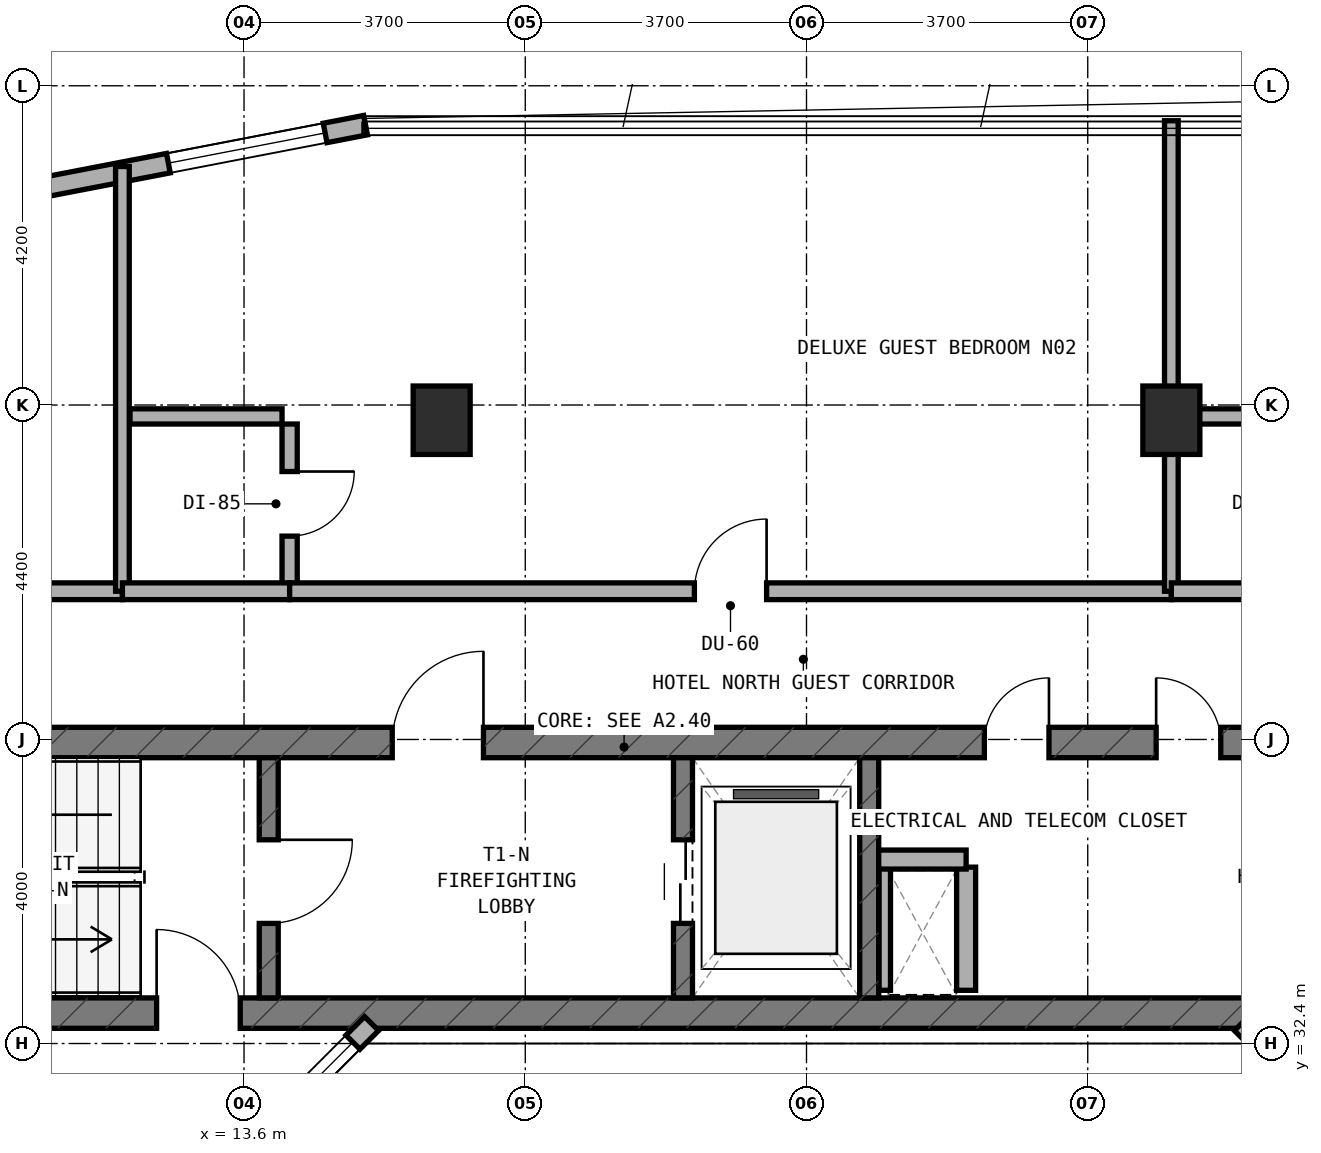
"""IFC4 building model, lengths in metres.
Left out: names, types, materials, properties, quantities, classifications, styles, units other than length and angle.
Written with IfcOpenShell. Run it as: python <this file> out.ifc"""

import sys

from ifc_helpers import new_model, si_unit, direction, frame, frame_2d, origin, origin_2d, place, context, subcontext, project, spatial, rectangle, extrude, element, fill, save


model = new_model("IFC4")
c1 = context("Model", 3, precision=1e-05, world=origin(), true_north=direction((0.0, 1.0)))
c2 = subcontext(c1, "Body", "Model", "MODEL_VIEW")
j1 = project(units=[si_unit("LENGTHUNIT", "METRE"), si_unit("PLANEANGLEUNIT", "RADIAN")], contexts=[c1])
p1 = place(None, origin())
s1 = spatial("IfcSite", under=j1, at=p1, CompositionType="ELEMENT")
p2 = place(p1, origin())
s2 = spatial("IfcBuilding", under=s1, at=p2, CompositionType="ELEMENT")
p3 = place(p2, frame((0.0, 0.0, 177.5)))
s3 = spatial("IfcBuildingStorey", under=s2, at=p3, CompositionType="ELEMENT", Elevation=177.5)
p4 = place(p3, frame((6.4, 32.8, 0.0), z_axis=(0.0, 0.0, 1.0), x_axis=(1.0, 0.0, 0.0)))
e1 = element("IfcWall", 1, at=p4, inside=s3, PredefinedType="SHEAR", context=c2, shape_type="SweptSolid", body=[
    extrude(rectangle(XDim=24.4, YDim=0.4, at=frame_2d((12.2, 0.0))), origin(), (0.0, 0.0, 1.0), 3.6),
])
p5 = place(p4, frame((6.05, 0.0, 0.0)))
e2 = element("IfcOpeningElement", 2, at=p5, cuts=e1, PredefinedType="OPENING", context=c2, shape_type="SweptSolid", body=[
    extrude(rectangle(XDim=1.1, YDim=2.15, at=frame_2d((0.55, 1.075))), frame((0.0, 0.21, 0.0), z_axis=(0.0, -1.0, 0.0), x_axis=(1.0, 0.0, 0.0)), (0.0, 0.0, 1.0), 0.42),
])
p6 = place(p3, frame((6.4, 36.36, 0.0), z_axis=(0.0, 0.0, 1.0), x_axis=(1.0, 0.0, 0.0)))
e3 = element("IfcWall", 3, at=p6, inside=s3, PredefinedType="SHEAR", context=c2, shape_type="SweptSolid", body=[
    extrude(rectangle(XDim=24.4, YDim=0.4, at=frame_2d((12.2, 0.0))), origin(), (0.0, 0.0, 1.0), 3.6),
])
p7 = place(p6, frame((9.15, 0.0, 0.0)))
e4 = element("IfcOpeningElement", 4, at=p7, cuts=e3, PredefinedType="OPENING", context=c2, shape_type="SweptSolid", body=[
    extrude(rectangle(XDim=1.2, YDim=2.15, at=frame_2d((0.6, 1.075))), frame((0.0, 0.21, 0.0), z_axis=(0.0, -1.0, 0.0), x_axis=(1.0, 0.0, 0.0)), (0.0, 0.0, 1.0), 0.42),
])
p8 = place(p6, frame((19.2, 0.0, 0.0)))
e5 = element("IfcOpeningElement", 5, at=p8, cuts=e3, PredefinedType="OPENING", context=c2, shape_type="SweptSolid", body=[
    extrude(rectangle(XDim=0.85, YDim=2.1, at=frame_2d((0.425, 1.05))), frame((0.0, 0.21, 0.0), z_axis=(0.0, -1.0, 0.0), x_axis=(1.0, 0.0, 0.0)), (0.0, 0.0, 1.0), 0.42),
])
p9 = place(p6, frame((16.94, 0.0, 0.0)))
e6 = element("IfcOpeningElement", 6, at=p9, cuts=e3, PredefinedType="OPENING", context=c2, shape_type="SweptSolid", body=[
    extrude(rectangle(XDim=0.85, YDim=2.1, at=frame_2d((0.425, 1.05))), frame((0.0, 0.21, 0.0), z_axis=(0.0, -1.0, 0.0), x_axis=(1.0, 0.0, 0.0)), (0.0, 0.0, 1.0), 0.42),
])
p10 = place(p3, frame((13.925, 33.0, 0.0), z_axis=(0.0, 0.0, 1.0), x_axis=(0.0, 1.0, 0.0)))
e7 = element("IfcWall", 7, at=p10, inside=s3, PredefinedType="STANDARD", context=c2, shape_type="SweptSolid", body=[
    extrude(rectangle(XDim=3.16, YDim=0.25, at=frame_2d((1.58, 0.0))), origin(), (0.0, 0.0, 1.0), 3.32),
])
p11 = place(p10, frame((0.98, 0.0, 0.0)))
e8 = element("IfcOpeningElement", 8, at=p11, cuts=e7, PredefinedType="OPENING", context=c2, shape_type="SweptSolid", body=[
    extrude(rectangle(XDim=1.1, YDim=2.15, at=frame_2d((0.55, 1.075))), frame((0.0, 0.135, 0.0), z_axis=(0.0, -1.0, 0.0), x_axis=(1.0, 0.0, 0.0)), (0.0, 0.0, 1.0), 0.27),
])
p12 = place(p3, frame((19.375, 33.0, 0.0), z_axis=(0.0, 0.0, 1.0), x_axis=(0.0, 1.0, 0.0)))
e9 = element("IfcWall", 9, at=p12, inside=s3, PredefinedType="STANDARD", context=c2, shape_type="SweptSolid", body=[
    extrude(rectangle(XDim=3.16, YDim=0.25, at=frame_2d((1.58, 0.0))), origin(), (0.0, 0.0, 1.0), 3.32),
])
p13 = place(p12, frame((0.98, 0.0, 0.0)))
e10 = element("IfcOpeningElement", 10, at=p13, cuts=e9, PredefinedType="OPENING", context=c2, shape_type="SweptSolid", body=[
    extrude(rectangle(XDim=1.1, YDim=2.15, at=frame_2d((0.55, 1.075))), frame((0.0, 0.135, 0.0), z_axis=(0.0, -1.0, 0.0), x_axis=(1.0, 0.0, 0.0)), (0.0, 0.0, 1.0), 0.27),
])
p14 = place(p3, frame((21.825, 33.0, 0.0), z_axis=(0.0, 0.0, 1.0), x_axis=(0.0, 1.0, 0.0)))
e11 = element("IfcWall", 11, at=p14, inside=s3, PredefinedType="STANDARD", context=c2, shape_type="SweptSolid", body=[
    extrude(rectangle(XDim=3.16, YDim=0.25, at=frame_2d((1.58, 0.0))), origin(), (0.0, 0.0, 1.0), 3.32),
])
for number, where, z_axis, x_axis in (
    (12, (16.2, 40.6, 0.0), (0.0, 0.0, 1.0), (1.0, 0.0, 0.0)),
    (13, (25.8, 40.6, 0.0), (0.0, 0.0, 1.0), (1.0, 0.0, 0.0)),
):
    element("IfcColumn", number, at=place(p3, frame(where, z_axis=z_axis, x_axis=x_axis)), inside=s3, PredefinedType="COLUMN", context=c2, shape_type="SweptSolid", body=[
        extrude(rectangle(XDim=0.75, YDim=0.9, at=origin_2d()), origin(), (0.0, 0.0, 1.0), 3.6),
    ])
p15 = place(p3, frame((13.515, 30.899, 0.0), z_axis=(0.0, 0.0, 1.0), x_axis=(0.707106781187, 0.707106781187, 0.0)))
e14 = element("IfcWall", 14, at=p15, inside=s3, PredefinedType="STANDARD", context=c2, shape_type="SweptSolid", body=[
    extrude(rectangle(XDim=2.493, YDim=0.26, at=frame_2d((1.247, 0.0))), origin(), (0.0, 0.0, 1.0), 3.32),
])
p16 = place(p15, frame((0.347, 0.0, 0.85)))
e15 = element("IfcOpeningElement", 15, at=p16, cuts=e14, PredefinedType="OPENING", context=c2, shape_type="SweptSolid", body=[
    extrude(rectangle(XDim=1.8, YDim=1.5, at=frame_2d((0.9, 0.75))), frame((0.0, 0.14, 0.0), z_axis=(0.0, -1.0, 0.0), x_axis=(1.0, 0.0, 0.0)), (0.0, 0.0, 1.0), 0.28),
])
p17 = place(p3, frame((26.722, 32.662, 0.0), z_axis=(0.0, 0.0, 1.0), x_axis=(0.707106781187, -0.707106781187, 0.0)))
e16 = element("IfcWall", 16, at=p17, inside=s3, PredefinedType="STANDARD", context=c2, shape_type="SweptSolid", body=[
    extrude(rectangle(XDim=2.529, YDim=0.26, at=frame_2d((1.264, 0.0))), origin(), (0.0, 0.0, 1.0), 3.32),
])
p18 = place(p17, frame((0.364, 0.0, 0.85)))
e17 = element("IfcOpeningElement", 17, at=p18, cuts=e16, PredefinedType="OPENING", context=c2, shape_type="SweptSolid", body=[
    extrude(rectangle(XDim=1.8, YDim=1.5, at=frame_2d((0.9, 0.75))), frame((0.0, 0.14, 0.0), z_axis=(0.0, -1.0, 0.0), x_axis=(1.0, 0.0, 0.0)), (0.0, 0.0, 1.0), 0.28),
])
p19 = place(p3, frame((15.199, 44.482, 0.0), z_axis=(0.0, 0.0, 1.0), x_axis=(-0.98192801022, -0.189254809039, 0.0)))
e18 = element("IfcWall", 18, at=p19, inside=s3, PredefinedType="STANDARD", context=c2, shape_type="SweptSolid", body=[
    extrude(rectangle(XDim=9.046, YDim=0.26, at=frame_2d((4.523, 0.0))), origin(), (0.0, 0.0, 1.0), 3.32),
])
p20 = place(p19, frame((0.542, 0.0, 0.85)))
e19 = element("IfcOpeningElement", 19, at=p20, cuts=e18, PredefinedType="OPENING", context=c2, shape_type="SweptSolid", body=[
    extrude(rectangle(XDim=2.1, YDim=1.5, at=frame_2d((1.05, 0.75))), frame((0.0, 0.14, 0.0), z_axis=(0.0, -1.0, 0.0), x_axis=(1.0, 0.0, 0.0)), (0.0, 0.0, 1.0), 0.28),
])
p21 = place(p19, frame((5.163, 0.0, 0.85)))
e20 = element("IfcOpeningElement", 20, at=p21, cuts=e18, PredefinedType="OPENING", context=c2, shape_type="SweptSolid", body=[
    extrude(rectangle(XDim=2.1, YDim=1.5, at=frame_2d((1.05, 0.75))), frame((0.0, 0.14, 0.0), z_axis=(0.0, -1.0, 0.0), x_axis=(1.0, 0.0, 0.0)), (0.0, 0.0, 1.0), 0.28),
])
p22 = place(p3, frame((22.03, 33.1, 0.0), z_axis=(0.0, 0.0, 1.0), x_axis=(0.0, 1.0, 0.0)))
e21 = element("IfcWall", 21, at=p22, inside=s3, PredefinedType="PARTITIONING", context=c2, shape_type="SweptSolid", body=[
    extrude(rectangle(XDim=1.62, YDim=0.15, at=frame_2d((0.81, 0.0))), origin(), (0.0, 0.0, 1.0), 3.32),
])
p23 = place(p3, frame((23.1, 33.1, 0.0), z_axis=(0.0, 0.0, 1.0), x_axis=(0.0, 1.0, 0.0)))
e22 = element("IfcWall", 22, at=p23, inside=s3, PredefinedType="SOLIDWALL", context=c2, shape_type="SweptSolid", body=[
    extrude(rectangle(XDim=1.62, YDim=0.25, at=frame_2d((0.81, 0.0))), origin(), (0.0, 0.0, 1.0), 3.32),
])
p24 = place(p3, frame((21.95, 34.82, 0.0), z_axis=(0.0, 0.0, 1.0), x_axis=(1.0, 0.0, 0.0)))
e23 = element("IfcWall", 23, at=p24, inside=s3, PredefinedType="SOLIDWALL", context=c2, shape_type="SweptSolid", body=[
    extrude(rectangle(XDim=1.15, YDim=0.25, at=frame_2d((0.575, 0.0))), origin(), (0.0, 0.0, 1.0), 3.32),
])
p25 = place(p3, frame((5.55, 38.35, 0.0), z_axis=(0.0, 0.0, 1.0), x_axis=(1.0, 0.0, 0.0)))
e24 = element("IfcWall", 24, at=p25, inside=s3, PredefinedType="SOLIDWALL", context=c2, shape_type="SweptSolid", body=[
    extrude(rectangle(XDim=6.45, YDim=0.22, at=frame_2d((3.225, 0.0))), origin(), (0.0, 0.0, 1.0), 2.995),
])
p26 = place(p25, frame((3.03, 0.0, 0.0)))
e25 = element("IfcOpeningElement", 25, at=p26, cuts=e24, PredefinedType="OPENING", context=c2, shape_type="SweptSolid", body=[
    extrude(rectangle(XDim=0.95, YDim=2.1, at=frame_2d((0.475, 1.05))), frame((0.0, 0.12, 0.0), z_axis=(0.0, -1.0, 0.0), x_axis=(1.0, 0.0, 0.0)), (0.0, 0.0, 1.0), 0.24),
])
p27 = place(p3, frame((12.0, 38.35, 0.0), z_axis=(0.0, 0.0, 1.0), x_axis=(0.0, 1.0, 0.0)))
e26 = element("IfcWall", 26, at=p27, inside=s3, PredefinedType="SOLIDWALL", context=c2, shape_type="SweptSolid", body=[
    extrude(rectangle(XDim=5.588, YDim=0.18, at=frame_2d((2.794, 0.0))), origin(), (0.0, 0.0, 1.0), 2.845),
])
p28 = place(p3, frame((14.2, 38.45, 0.0), z_axis=(0.0, 0.0, 1.0), x_axis=(0.0, 1.0, 0.0)))
e27 = element("IfcWall", 27, at=p28, inside=s3, PredefinedType="PLUMBINGWALL", context=c2, shape_type="SweptSolid", body=[
    extrude(rectangle(XDim=2.1, YDim=0.2, at=frame_2d((1.05, 0.0))), origin(), (0.0, 0.0, 1.0), 2.845),
])
p29 = place(p28, frame((0.625, 0.0, 0.0)))
e28 = element("IfcOpeningElement", 28, at=p29, cuts=e27, PredefinedType="OPENING", context=c2, shape_type="SweptSolid", body=[
    extrude(rectangle(XDim=0.85, YDim=2.1, at=frame_2d((0.425, 1.05))), frame((0.0, 0.11, 0.0), z_axis=(0.0, -1.0, 0.0), x_axis=(1.0, 0.0, 0.0)), (0.0, 0.0, 1.0), 0.22),
])
p30 = place(p3, frame((12.1, 40.65, 0.0), z_axis=(0.0, 0.0, 1.0), x_axis=(1.0, 0.0, 0.0)))
e29 = element("IfcWall", 29, at=p30, inside=s3, PredefinedType="PLUMBINGWALL", context=c2, shape_type="SweptSolid", body=[
    extrude(rectangle(XDim=2.0, YDim=0.2, at=frame_2d((1.0, 0.0))), origin(), (0.0, 0.0, 1.0), 2.935),
])
p31 = place(p3, frame((12.0, 38.35, 0.0), z_axis=(0.0, 0.0, 1.0), x_axis=(1.0, 0.0, 0.0)))
e30 = element("IfcWall", 30, at=p31, inside=s3, PredefinedType="SOLIDWALL", context=c2, shape_type="SweptSolid", body=[
    extrude(rectangle(XDim=2.2, YDim=0.22, at=frame_2d((1.1, 0.0))), origin(), (0.0, 0.0, 1.0), 3.32),
])
p32 = place(p3, frame((14.2, 38.35, 0.0), z_axis=(0.0, 0.0, 1.0), x_axis=(1.0, 0.0, 0.0)))
e31 = element("IfcWall", 31, at=p32, inside=s3, PredefinedType="SOLIDWALL", context=c2, shape_type="SweptSolid", body=[
    extrude(rectangle(XDim=11.6, YDim=0.22, at=frame_2d((5.8, 0.0))), origin(), (0.0, 0.0, 1.0), 2.995),
])
p33 = place(p32, frame((5.325, 0.0, 0.0)))
e32 = element("IfcOpeningElement", 32, at=p33, cuts=e31, PredefinedType="OPENING", context=c2, shape_type="SweptSolid", body=[
    extrude(rectangle(XDim=0.95, YDim=2.1, at=frame_2d((0.475, 1.05))), frame((0.0, 0.12, 0.0), z_axis=(0.0, -1.0, 0.0), x_axis=(1.0, 0.0, 0.0)), (0.0, 0.0, 1.0), 0.24),
])
p34 = place(p3, frame((25.8, 38.35, 0.0), z_axis=(0.0, 0.0, 1.0), x_axis=(0.0, 1.0, 0.0)))
e33 = element("IfcWall", 33, at=p34, inside=s3, PredefinedType="SOLIDWALL", context=c2, shape_type="SweptSolid", body=[
    extrude(rectangle(XDim=6.19, YDim=0.18, at=frame_2d((3.095, 0.0))), origin(), (0.0, 0.0, 1.0), 2.935),
])
p35 = place(p3, frame((25.9, 40.65, 0.0), z_axis=(0.0, 0.0, 1.0), x_axis=(1.0, 0.0, 0.0)))
e34 = element("IfcWall", 34, at=p35, inside=s3, PredefinedType="PLUMBINGWALL", context=c2, shape_type="SweptSolid", body=[
    extrude(rectangle(XDim=2.0, YDim=0.2, at=frame_2d((1.0, 0.0))), origin(), (0.0, 0.0, 1.0), 2.935),
])
p36 = place(p3, frame((25.8, 38.35, 0.0), z_axis=(0.0, 0.0, 1.0), x_axis=(1.0, 0.0, 0.0)))
e35 = element("IfcWall", 35, at=p36, inside=s3, PredefinedType="SOLIDWALL", context=c2, shape_type="SweptSolid", body=[
    extrude(rectangle(XDim=2.2, YDim=0.22, at=frame_2d((1.1, 0.0))), origin(), (0.0, 0.0, 1.0), 2.995),
])
p37 = place(p16, origin())
e36 = element("IfcWindow", 36, at=p37, inside=s3, PartitioningType="SINGLE_PANEL", PredefinedType="WINDOW", context=c2, shape_type="SweptSolid", body=[
    extrude(rectangle(XDim=1.8, YDim=1.5, at=frame_2d((0.9, 0.75))), frame((0.0, 0.03, 0.0), z_axis=(0.0, -1.0, 0.0), x_axis=(1.0, 0.0, 0.0)), (0.0, 0.0, 1.0), 0.06),
])
fill(e15, e36)
p38 = place(p20, origin())
e37 = element("IfcWindow", 37, at=p38, inside=s3, PartitioningType="SINGLE_PANEL", PredefinedType="WINDOW", context=c2, shape_type="SweptSolid", body=[
    extrude(rectangle(XDim=2.1, YDim=1.5, at=frame_2d((1.05, 0.75))), frame((0.0, 0.03, 0.0), z_axis=(0.0, -1.0, 0.0), x_axis=(1.0, 0.0, 0.0)), (0.0, 0.0, 1.0), 0.06),
])
fill(e19, e37)
p39 = place(p11, frame((1.1, 0.0, 0.0), z_axis=(0.0, 0.0, 1.0), x_axis=(-1.0, 0.0, 0.0)))
e38 = element("IfcDoor", 38, at=p39, inside=s3, OperationType="SINGLE_SWING_LEFT", PredefinedType="DOOR", context=c2, shape_type="SweptSolid", body=[
    extrude(rectangle(XDim=1.1, YDim=2.15, at=frame_2d((0.55, 1.075))), frame((0.0, 0.025, 0.0), z_axis=(0.0, -1.0, 0.0), x_axis=(1.0, 0.0, 0.0)), (0.0, 0.0, 1.0), 0.05),
])
fill(e8, e38)
p40 = place(p7, origin())
e39 = element("IfcDoor", 39, at=p40, inside=s3, OperationType="SINGLE_SWING_RIGHT", PredefinedType="DOOR", context=c2, shape_type="SweptSolid", body=[
    extrude(rectangle(XDim=1.2, YDim=2.15, at=frame_2d((0.6, 1.075))), frame((0.0, 0.025, 0.0), z_axis=(0.0, -1.0, 0.0), x_axis=(1.0, 0.0, 0.0)), (0.0, 0.0, 1.0), 0.05),
])
fill(e4, e39)
p41 = place(p13, origin())
e40 = element("IfcDoor", 40, at=p41, inside=s3, OperationType="DOUBLE_DOOR_SLIDING", PredefinedType="DOOR", context=c2, shape_type="SweptSolid", body=[
    extrude(rectangle(XDim=1.1, YDim=2.15, at=frame_2d((0.55, 1.075))), frame((0.0, 0.025, 0.0), z_axis=(0.0, -1.0, 0.0), x_axis=(1.0, 0.0, 0.0)), (0.0, 0.0, 1.0), 0.05),
])
fill(e10, e40)
p42 = place(p8, origin())
e41 = element("IfcDoor", 41, at=p42, inside=s3, OperationType="SINGLE_SWING_LEFT", PredefinedType="DOOR", context=c2, shape_type="SweptSolid", body=[
    extrude(rectangle(XDim=0.85, YDim=2.1, at=frame_2d((0.425, 1.05))), frame((0.0, 0.025, 0.0), z_axis=(0.0, -1.0, 0.0), x_axis=(1.0, 0.0, 0.0)), (0.0, 0.0, 1.0), 0.05),
])
fill(e5, e41)
p43 = place(p9, origin())
e42 = element("IfcDoor", 42, at=p43, inside=s3, OperationType="SINGLE_SWING_RIGHT", PredefinedType="DOOR", context=c2, shape_type="SweptSolid", body=[
    extrude(rectangle(XDim=0.85, YDim=2.1, at=frame_2d((0.425, 1.05))), frame((0.0, 0.025, 0.0), z_axis=(0.0, -1.0, 0.0), x_axis=(1.0, 0.0, 0.0)), (0.0, 0.0, 1.0), 0.05),
])
fill(e6, e42)
p44 = place(p5, origin())
e43 = element("IfcDoor", 43, at=p44, inside=s3, OperationType="SINGLE_SWING_LEFT", PredefinedType="DOOR", context=c2, shape_type="SweptSolid", body=[
    extrude(rectangle(XDim=1.1, YDim=2.15, at=frame_2d((0.55, 1.075))), frame((0.0, 0.025, 0.0), z_axis=(0.0, -1.0, 0.0), x_axis=(1.0, 0.0, 0.0)), (0.0, 0.0, 1.0), 0.05),
])
fill(e2, e43)
p45 = place(p29, frame((0.85, 0.0, 0.0), z_axis=(0.0, 0.0, 1.0), x_axis=(-1.0, 0.0, 0.0)))
e44 = element("IfcDoor", 44, at=p45, inside=s3, OperationType="SINGLE_SWING_LEFT", PredefinedType="DOOR", context=c2, shape_type="SweptSolid", body=[
    extrude(rectangle(XDim=0.85, YDim=2.1, at=frame_2d((0.425, 1.05))), frame((0.0, 0.025, 0.0), z_axis=(0.0, -1.0, 0.0), x_axis=(1.0, 0.0, 0.0)), (0.0, 0.0, 1.0), 0.05),
])
fill(e28, e44)
p46 = place(p33, origin())
e45 = element("IfcDoor", 45, at=p46, inside=s3, OperationType="SINGLE_SWING_RIGHT", PredefinedType="DOOR", context=c2, shape_type="SweptSolid", body=[
    extrude(rectangle(XDim=0.95, YDim=2.1, at=frame_2d((0.475, 1.05))), frame((0.0, 0.025, 0.0), z_axis=(0.0, -1.0, 0.0), x_axis=(1.0, 0.0, 0.0)), (0.0, 0.0, 1.0), 0.05),
])
fill(e32, e45)
save(model, sys.argv[1])
